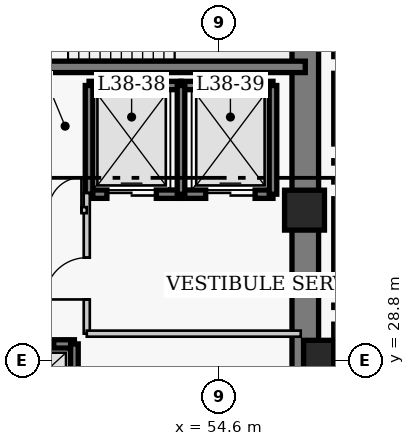
"""IFC4 building model, lengths in metres.
Left out: names, types, materials, properties, quantities, classifications, styles, units other than length and angle.
Written with IfcOpenShell. Run it as: python <this file> out.ifc"""

import sys

from ifc_helpers import new_model, si_unit, direction, frame, frame_2d, origin, origin_2d, place, context, subcontext, project, spatial, rectangle, extrude, element, fill, save


model = new_model("IFC4")
c1 = context("Model", 3, precision=1e-05, world=origin(), true_north=direction((0.0, 1.0)))
c2 = subcontext(c1, "Body", "Model", "MODEL_VIEW")
j1 = project(units=[si_unit("LENGTHUNIT", "METRE"), si_unit("PLANEANGLEUNIT", "RADIAN")], contexts=[c1])
p1 = place(None, origin())
s1 = spatial("IfcSite", under=j1, at=p1, CompositionType="ELEMENT")
p2 = place(p1, origin())
s2 = spatial("IfcBuilding", under=s1, at=p2, CompositionType="ELEMENT")
p3 = place(p2, frame((0.0, 0.0, 153.6)))
s3 = spatial("IfcBuildingStorey", under=s2, at=p3, CompositionType="ELEMENT", Elevation=153.6)
p4 = place(p3, frame((56.87, 27.05, 0.0), z_axis=(0.0, 0.0, 1.0), x_axis=(0.0, 1.0, 0.0)))
e1 = element("IfcWall", 1, at=p4, inside=s3, PredefinedType="SHEAR", context=c2, shape_type="SweptSolid", body=[
    extrude(rectangle(XDim=13.62, YDim=0.7, at=frame_2d((6.81, 0.0))), origin(), (0.0, 0.0, 1.0), 3.8),
])
p5 = place(p3, frame((48.45, 36.52, 0.0), z_axis=(0.0, 0.0, 1.0), x_axis=(1.0, 0.0, 0.0)))
e2 = element("IfcWall", 2, at=p5, inside=s3, PredefinedType="SHEAR", context=c2, shape_type="SweptSolid", body=[
    extrude(rectangle(XDim=8.42, YDim=0.3, at=frame_2d((4.21, 0.0))), origin(), (0.0, 0.0, 1.0), 3.8),
])
for number, where, z_axis, x_axis in (
    (3, (57.35, 28.8, 0.0), (0.0, 0.0, 1.0), (1.0, 0.0, 0.0)),
    (4, (56.85, 32.75, 0.0), (0.0, 0.0, 1.0), (1.0, 0.0, 0.0)),
):
    element("IfcColumn", number, at=place(p3, frame(where, z_axis=z_axis, x_axis=x_axis)), inside=s3, PredefinedType="COLUMN", context=c2, shape_type="SweptSolid", body=[
        extrude(rectangle(XDim=1.05, YDim=1.05, at=origin_2d()), origin(), (0.0, 0.0, 1.0), 3.8),
    ])
p6 = place(p3, frame((48.55, 29.23, 0.0), z_axis=(0.0, 0.0, 1.0), x_axis=(1.0, 0.0, 0.0)))
e5 = element("IfcWall", 5, at=p6, inside=s3, PredefinedType="SHEAR", context=c2, shape_type="SweptSolid", body=[
    extrude(rectangle(XDim=2.245, YDim=0.22, at=frame_2d((1.123, 0.0))), origin(), (0.0, 0.0, 1.0), 3.8),
])
p7 = place(p6, frame((0.6, 0.0, 0.0)))
e6 = element("IfcOpeningElement", 6, at=p7, cuts=e5, PredefinedType="OPENING", context=c2, shape_type="SweptSolid", body=[
    extrude(rectangle(XDim=1.1, YDim=2.15, at=frame_2d((0.55, 1.075))), frame((0.0, 0.12, 0.0), z_axis=(0.0, -1.0, 0.0), x_axis=(1.0, 0.0, 0.0)), (0.0, 0.0, 1.0), 0.24),
])
p8 = place(p3, frame((50.795, 27.17, 0.0), z_axis=(0.0, 0.0, 1.0), x_axis=(0.0, 1.0, 0.0)))
e7 = element("IfcWall", 7, at=p8, inside=s3, PredefinedType="SHEAR", context=c2, shape_type="SweptSolid", body=[
    extrude(rectangle(XDim=2.06, YDim=0.2, at=frame_2d((1.03, 0.0))), origin(), (0.0, 0.0, 1.0), 3.8),
])
p9 = place(p3, frame((51.18, 36.03, 0.0), z_axis=(0.0, 0.0, 1.0), x_axis=(1.0, 0.0, 0.0)))
e8 = element("IfcWall", 8, at=p9, inside=s3, PredefinedType="SHEAR", context=c2, shape_type="SweptSolid", body=[
    extrude(rectangle(XDim=2.42, YDim=0.22, at=frame_2d((1.21, 0.0))), origin(), (0.0, 0.0, 1.0), 3.8),
])
p10 = place(p3, frame((51.18, 33.17, 0.0), z_axis=(0.0, 0.0, 1.0), x_axis=(1.0, 0.0, 0.0)))
e9 = element("IfcWall", 9, at=p10, inside=s3, PredefinedType="SHEAR", context=c2, shape_type="SweptSolid", body=[
    extrude(rectangle(XDim=2.42, YDim=0.22, at=frame_2d((1.21, 0.0))), origin(), (0.0, 0.0, 1.0), 3.8),
])
p11 = place(p10, frame((0.47, 0.0, 0.0)))
e10 = element("IfcOpeningElement", 10, at=p11, cuts=e9, PredefinedType="OPENING", context=c2, shape_type="SweptSolid", body=[
    extrude(rectangle(XDim=1.3, YDim=2.15, at=frame_2d((0.65, 1.075))), frame((0.0, 0.12, 0.0), z_axis=(0.0, -1.0, 0.0), x_axis=(1.0, 0.0, 0.0)), (0.0, 0.0, 1.0), 0.24),
])
p12 = place(p3, frame((51.18, 33.17, 0.0), z_axis=(0.0, 0.0, 1.0), x_axis=(0.0, 1.0, 0.0)))
e11 = element("IfcWall", 11, at=p12, inside=s3, PredefinedType="SHEAR", context=c2, shape_type="SweptSolid", body=[
    extrude(rectangle(XDim=2.86, YDim=0.2, at=frame_2d((1.43, 0.0))), origin(), (0.0, 0.0, 1.0), 3.8),
])
p13 = place(p3, frame((53.6, 36.03, 0.0), z_axis=(0.0, 0.0, 1.0), x_axis=(1.0, 0.0, 0.0)))
e12 = element("IfcWall", 12, at=p13, inside=s3, PredefinedType="SHEAR", context=c2, shape_type="SweptSolid", body=[
    extrude(rectangle(XDim=2.42, YDim=0.22, at=frame_2d((1.21, 0.0))), origin(), (0.0, 0.0, 1.0), 3.8),
])
p14 = place(p3, frame((53.6, 33.17, 0.0), z_axis=(0.0, 0.0, 1.0), x_axis=(1.0, 0.0, 0.0)))
e13 = element("IfcWall", 13, at=p14, inside=s3, PredefinedType="SHEAR", context=c2, shape_type="SweptSolid", body=[
    extrude(rectangle(XDim=2.42, YDim=0.22, at=frame_2d((1.21, 0.0))), origin(), (0.0, 0.0, 1.0), 3.8),
])
p15 = place(p14, frame((0.65, 0.0, 0.0)))
e14 = element("IfcOpeningElement", 14, at=p15, cuts=e13, PredefinedType="OPENING", context=c2, shape_type="SweptSolid", body=[
    extrude(rectangle(XDim=1.3, YDim=2.15, at=frame_2d((0.65, 1.075))), frame((0.0, 0.12, 0.0), z_axis=(0.0, -1.0, 0.0), x_axis=(1.0, 0.0, 0.0)), (0.0, 0.0, 1.0), 0.24),
])
for number, where, z_axis, x_axis in (
    (15, (53.6, 33.17, 0.0), (0.0, 0.0, 1.0), (0.0, 1.0, 0.0)),
    (16, (56.02, 33.17, 0.0), (0.0, 0.0, 1.0), (0.0, 1.0, 0.0)),
):
    element("IfcWall", number, at=place(p3, frame(where, z_axis=z_axis, x_axis=x_axis)), inside=s3, PredefinedType="SHEAR", context=c2, shape_type="SweptSolid", body=[
        extrude(rectangle(XDim=2.86, YDim=0.2, at=frame_2d((1.43, 0.0))), origin(), (0.0, 0.0, 1.0), 3.8),
    ])
p16 = place(p3, frame((51.12, 29.5, 0.0), z_axis=(0.0, 0.0, 1.0), x_axis=(0.0, 1.0, 0.0)))
e17 = element("IfcWall", 17, at=p16, inside=s3, PredefinedType="PARTITIONING", context=c2, shape_type="SweptSolid", body=[
    extrude(rectangle(XDim=3.7, YDim=0.16, at=frame_2d((1.85, 0.0))), origin(), (0.0, 0.0, 1.0), 3.55),
])
p17 = place(p16, frame((0.9, 0.0, 0.0)))
e18 = element("IfcOpeningElement", 18, at=p17, cuts=e17, PredefinedType="OPENING", context=c2, shape_type="SweptSolid", body=[
    extrude(rectangle(XDim=1.1, YDim=2.15, at=frame_2d((0.55, 1.075))), frame((0.0, 0.09, 0.0), z_axis=(0.0, -1.0, 0.0), x_axis=(1.0, 0.0, 0.0)), (0.0, 0.0, 1.0), 0.18),
])
p18 = place(p3, frame((51.12, 29.5, 0.0), z_axis=(0.0, 0.0, 1.0), x_axis=(1.0, 0.0, 0.0)))
e19 = element("IfcWall", 19, at=p18, inside=s3, PredefinedType="PARTITIONING", context=c2, shape_type="SweptSolid", body=[
    extrude(rectangle(XDim=5.63, YDim=0.16, at=frame_2d((2.815, 0.0))), origin(), (0.0, 0.0, 1.0), 3.55),
])
p19 = place(p3, frame((48.92, 32.75, 0.0), z_axis=(0.0, 0.0, 1.0), x_axis=(1.0, 0.0, 0.0)))
e20 = element("IfcWall", 20, at=p19, inside=s3, PredefinedType="PARTITIONING", context=c2, shape_type="SweptSolid", body=[
    extrude(rectangle(XDim=2.2, YDim=0.16, at=frame_2d((1.1, 0.0))), origin(), (0.0, 0.0, 1.0), 3.55),
])
p20 = place(p19, frame((0.14, 0.0, 0.0)))
e21 = element("IfcOpeningElement", 21, at=p20, cuts=e20, PredefinedType="OPENING", context=c2, shape_type="SweptSolid", body=[
    extrude(rectangle(XDim=0.86, YDim=2.05, at=frame_2d((0.43, 1.025))), frame((0.0, 0.09, 0.0), z_axis=(0.0, -1.0, 0.0), x_axis=(1.0, 0.0, 0.0)), (0.0, 0.0, 1.0), 0.18),
])
p21 = place(p19, frame((1.2, 0.0, 0.0)))
e22 = element("IfcOpeningElement", 22, at=p21, cuts=e20, PredefinedType="OPENING", context=c2, shape_type="SweptSolid", body=[
    extrude(rectangle(XDim=0.86, YDim=2.05, at=frame_2d((0.43, 1.025))), frame((0.0, 0.09, 0.0), z_axis=(0.0, -1.0, 0.0), x_axis=(1.0, 0.0, 0.0)), (0.0, 0.0, 1.0), 0.18),
])
p22 = place(p7, origin())
e23 = element("IfcDoor", 23, at=p22, inside=s3, OperationType="DOUBLE_DOOR_SLIDING", PredefinedType="DOOR", context=c2, shape_type="SweptSolid", body=[
    extrude(rectangle(XDim=1.1, YDim=2.15, at=frame_2d((0.55, 1.075))), frame((0.0, 0.025, 0.0), z_axis=(0.0, -1.0, 0.0), x_axis=(1.0, 0.0, 0.0)), (0.0, 0.0, 1.0), 0.05),
])
fill(e6, e23)
p23 = place(p11, origin())
e24 = element("IfcDoor", 24, at=p23, inside=s3, OperationType="DOUBLE_DOOR_SLIDING", PredefinedType="DOOR", context=c2, shape_type="SweptSolid", body=[
    extrude(rectangle(XDim=1.3, YDim=2.15, at=frame_2d((0.65, 1.075))), frame((0.0, 0.025, 0.0), z_axis=(0.0, -1.0, 0.0), x_axis=(1.0, 0.0, 0.0)), (0.0, 0.0, 1.0), 0.05),
])
fill(e10, e24)
p24 = place(p15, origin())
e25 = element("IfcDoor", 25, at=p24, inside=s3, OperationType="DOUBLE_DOOR_SLIDING", PredefinedType="DOOR", context=c2, shape_type="SweptSolid", body=[
    extrude(rectangle(XDim=1.3, YDim=2.15, at=frame_2d((0.65, 1.075))), frame((0.0, 0.025, 0.0), z_axis=(0.0, -1.0, 0.0), x_axis=(1.0, 0.0, 0.0)), (0.0, 0.0, 1.0), 0.05),
])
fill(e14, e25)
p25 = place(p17, origin())
e26 = element("IfcDoor", 26, at=p25, inside=s3, OperationType="SINGLE_SWING_LEFT", PredefinedType="DOOR", context=c2, shape_type="SweptSolid", body=[
    extrude(rectangle(XDim=1.1, YDim=2.15, at=frame_2d((0.55, 1.075))), frame((0.0, 0.025, 0.0), z_axis=(0.0, -1.0, 0.0), x_axis=(1.0, 0.0, 0.0)), (0.0, 0.0, 1.0), 0.05),
])
fill(e18, e26)
p26 = place(p21, origin())
e27 = element("IfcDoor", 27, at=p26, inside=s3, OperationType="SINGLE_SWING_RIGHT", PredefinedType="DOOR", context=c2, shape_type="SweptSolid", body=[
    extrude(rectangle(XDim=0.86, YDim=2.05, at=frame_2d((0.43, 1.025))), frame((0.0, 0.025, 0.0), z_axis=(0.0, -1.0, 0.0), x_axis=(1.0, 0.0, 0.0)), (0.0, 0.0, 1.0), 0.05),
])
fill(e22, e27)
save(model, sys.argv[1])
